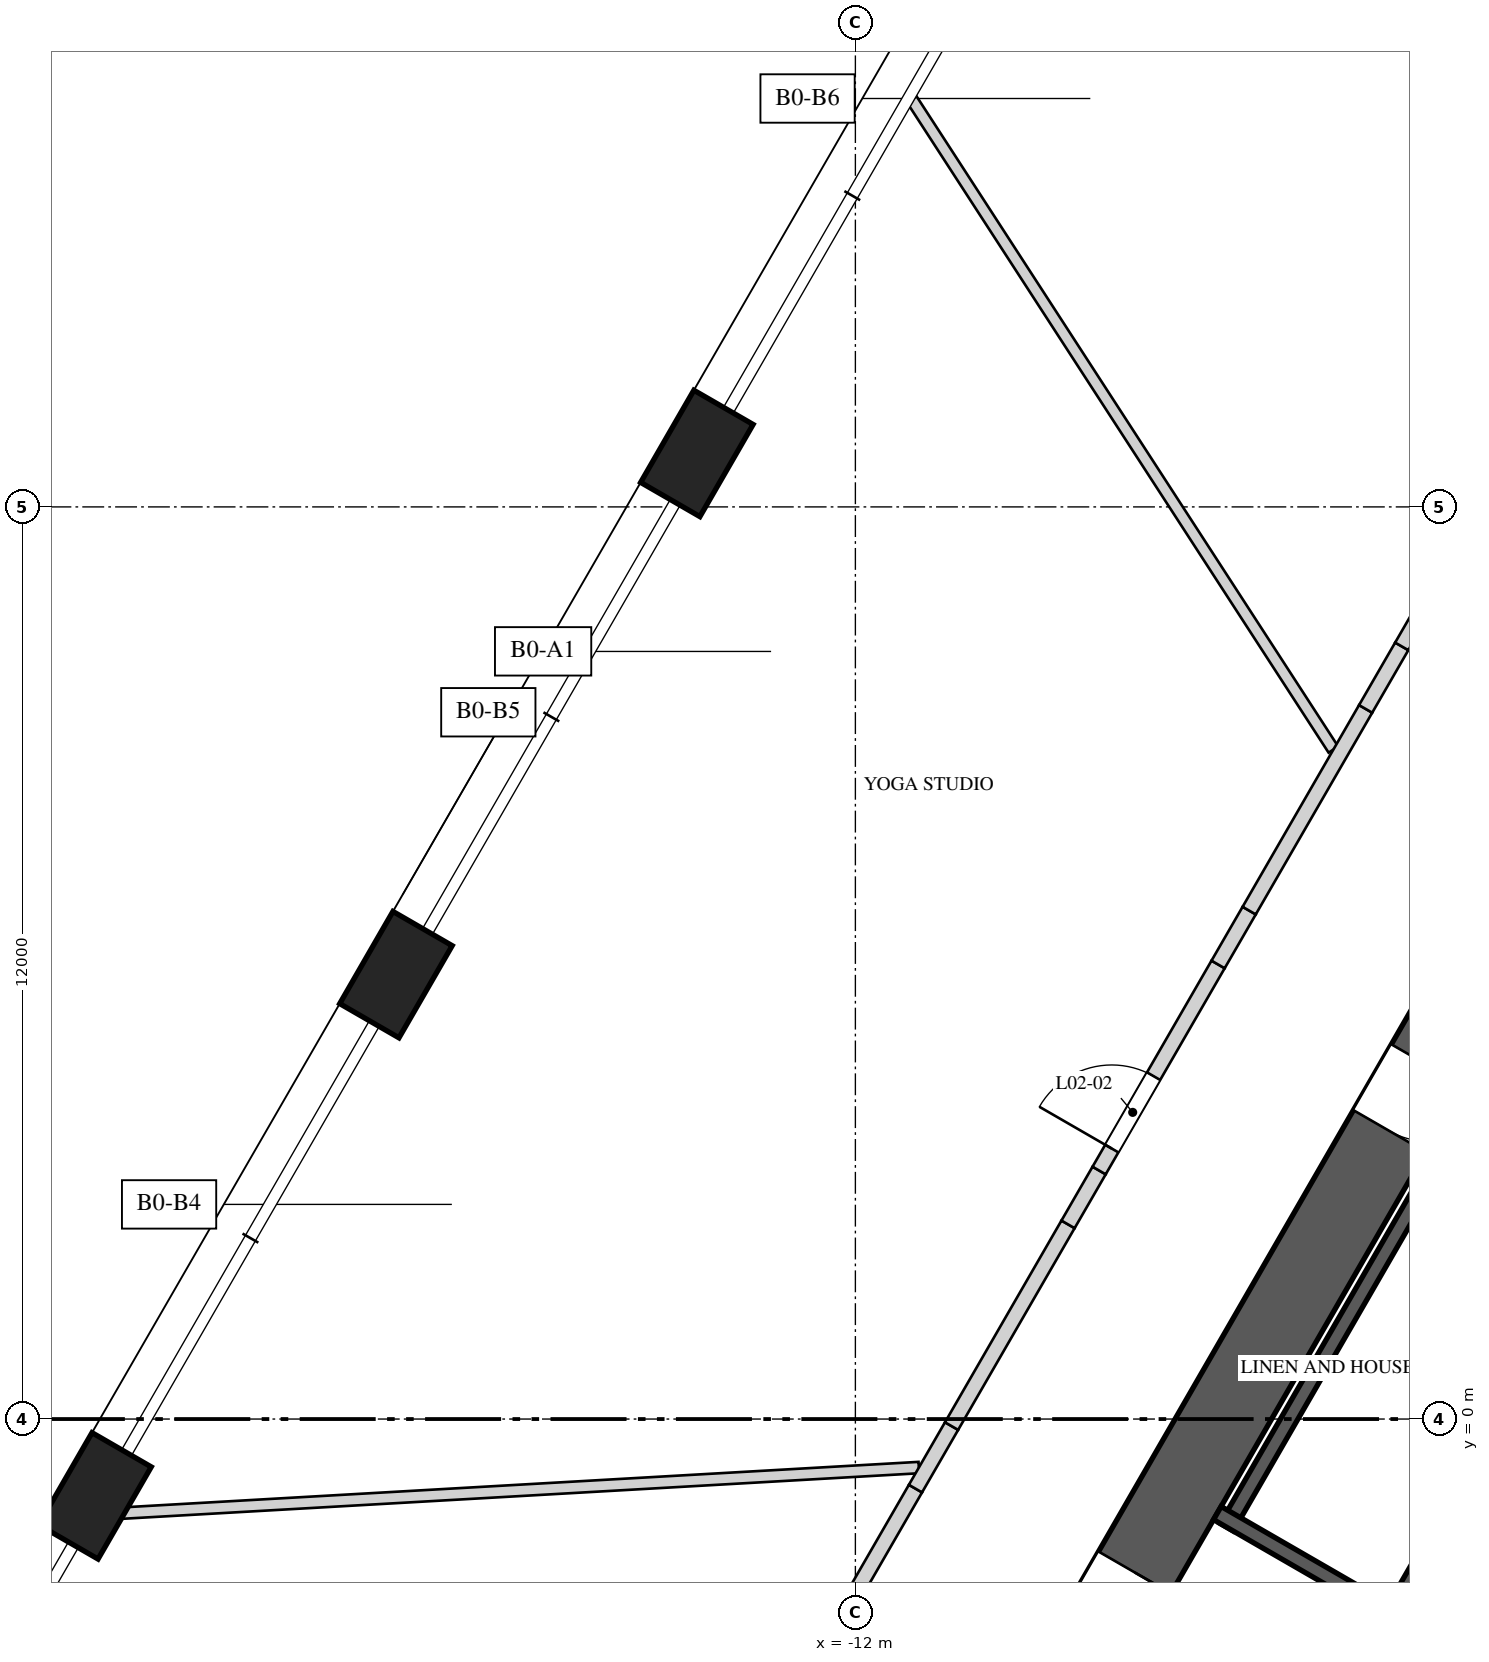
"""IFC4 building model, lengths in metres.
Left out: names, types, materials, properties, quantities, classifications, styles, units other than length and angle.
Written with IfcOpenShell. Run it as: python <this file> out.ifc"""

import sys

from ifc_helpers import new_model, si_unit, direction, frame, frame_2d, origin, origin_2d, place, context, subcontext, project, spatial, rectangle, extrude, element, fill, save


model = new_model("IFC4")
c1 = context("Model", 3, precision=1e-05, world=origin(), true_north=direction((0.0, 1.0)))
c2 = subcontext(c1, "Body", "Model", "MODEL_VIEW")
j1 = project(units=[si_unit("LENGTHUNIT", "METRE"), si_unit("PLANEANGLEUNIT", "RADIAN")], contexts=[c1])
p1 = place(None, origin())
s1 = spatial("IfcSite", under=j1, at=p1, CompositionType="ELEMENT")
p2 = place(p1, origin())
s2 = spatial("IfcBuilding", under=s1, at=p2, CompositionType="ELEMENT")
p3 = place(p2, frame((0.0, 0.0, 15.0)))
s3 = spatial("IfcBuildingStorey", under=s2, at=p3, CompositionType="ELEMENT", Elevation=15.0)
p4 = place(p3, frame((-1.126, 10.45, 0.0), z_axis=(0.0, 0.0, 1.0), x_axis=(-0.500001757713, -0.866024388966, 0.0)))
e1 = element("IfcWall", 1, at=p4, inside=s3, PredefinedType="SHEAR", context=c2, shape_type="SweptSolid", body=[
    extrude(rectangle(XDim=16.974, YDim=1.1, at=frame_2d((8.487, 0.0))), origin(), (0.0, 0.0, 1.0), 5.0),
])
p5 = place(p4, frame((6.692, 0.0, 0.0)))
e2 = element("IfcOpeningElement", 2, at=p5, cuts=e1, PredefinedType="OPENING", context=c2, shape_type="SweptSolid", body=[
    extrude(rectangle(XDim=1.0, YDim=2.4, at=frame_2d((0.5, 1.2))), frame((0.0, 0.56, 0.0), z_axis=(0.0, -1.0, 0.0), x_axis=(1.0, 0.0, 0.0)), (0.0, 0.0, 1.0), 1.12),
])
p6 = place(p4, frame((14.397, 0.0, 0.0)))
e3 = element("IfcOpeningElement", 3, at=p6, cuts=e1, PredefinedType="OPENING", context=c2, shape_type="SweptSolid", body=[
    extrude(rectangle(XDim=0.8, YDim=2.1, at=frame_2d((0.4, 1.05))), frame((0.0, 0.56, 0.0), z_axis=(0.0, -1.0, 0.0), x_axis=(1.0, 0.0, 0.0)), (0.0, 0.0, 1.0), 1.12),
])
for number, where, z_axis, x_axis in (
    (4, (-14.085, 12.704, 0.0), (0.0, 0.0, 1.0), (-0.5, -0.866, 0.0)),
    (5, (-18.044, 5.846, 0.0), (0.0, 0.0, 1.0), (-0.5, -0.866, 0.0)),
    (6, (-22.003, -1.011, 0.0), (0.0, 0.0, 1.0), (-0.5, -0.866, 0.0)),
):
    element("IfcColumn", number, at=place(p3, frame(where, z_axis=z_axis, x_axis=x_axis)), inside=s3, PredefinedType="COLUMN", context=c2, shape_type="SweptSolid", body=[
        extrude(rectangle(XDim=1.4, YDim=0.9, at=origin_2d()), origin(), (0.0, 0.0, 1.0), 5.0),
    ])
p7 = place(p3, frame((-4.993, -2.648, 0.0), z_axis=(0.0, 0.0, 1.0), x_axis=(0.499996545922, 0.866027397988, 0.0)))
e7 = element("IfcWall", 7, at=p7, inside=s3, PredefinedType="SOLIDWALL", context=c2, shape_type="SweptSolid", body=[
    extrude(rectangle(XDim=5.5, YDim=0.2, at=frame_2d((2.75, 0.0))), origin(), (0.0, 0.0, 1.0), 4.65),
])
p8 = place(p7, frame((2.275, 0.0, 0.0)))
e8 = element("IfcOpeningElement", 8, at=p8, cuts=e7, PredefinedType="OPENING", context=c2, shape_type="SweptSolid", body=[
    extrude(rectangle(XDim=0.95, YDim=2.4, at=frame_2d((0.475, 1.2))), frame((0.0, 0.11, 0.0), z_axis=(0.0, -1.0, 0.0), x_axis=(1.0, 0.0, 0.0)), (0.0, 0.0, 1.0), 0.22),
])
p9 = place(p3, frame((-4.365, 3.34, 0.0), z_axis=(0.0, 0.0, 1.0), x_axis=(-0.499996545922, -0.866027397988, 0.0)))
e9 = element("IfcWall", 9, at=p9, inside=s3, PredefinedType="SOLIDWALL", context=c2, shape_type="SweptSolid", body=[
    extrude(rectangle(XDim=5.5, YDim=0.2, at=frame_2d((2.75, 0.0))), origin(), (0.0, 0.0, 1.0), 4.65),
])
p10 = place(p3, frame((-5.03, -2.512, 0.0), z_axis=(0.0, 0.0, 1.0), x_axis=(-0.865989465428, 0.500062241894, 0.0)))
e10 = element("IfcWall", 10, at=p10, inside=s3, PredefinedType="SOLIDWALL", context=c2, shape_type="SweptSolid", body=[
    extrude(rectangle(XDim=2.55, YDim=0.2, at=frame_2d((1.275, 0.0))), origin(), (0.0, 0.0, 1.0), 4.65),
])
p11 = place(p3, frame((-11.165, -0.638, 0.0), z_axis=(0.0, 0.0, 1.0), x_axis=(-0.998369760977, -0.057077319203, 0.0)))
e11 = element("IfcWall", 11, at=p11, inside=s3, PredefinedType="PARTITIONING", context=c2, shape_type="SweptSolid", body=[
    extrude(rectangle(XDim=10.86, YDim=0.15, at=frame_2d((5.43, 0.0))), origin(), (0.0, 0.0, 1.0), 3.75),
])
p12 = place(p3, frame((-5.711, 8.808, 0.0), z_axis=(0.0, 0.0, 1.0), x_axis=(-0.544077203012, 0.839035158478, 0.0)))
e12 = element("IfcWall", 12, at=p12, inside=s3, PredefinedType="PARTITIONING", context=c2, shape_type="SweptSolid", body=[
    extrude(rectangle(XDim=10.194, YDim=0.15, at=frame_2d((5.097, 0.0))), origin(), (0.0, 0.0, 1.0), 4.65),
])
p13 = place(p3, frame((-12.617, -3.354, 0.0), z_axis=(0.0, 0.0, 1.0), x_axis=(0.49993514545, 0.866062844338, 0.0)))
e13 = element("IfcWall", 13, at=p13, inside=s3, PredefinedType="SOLIDWALL", context=c2, shape_type="SweptSolid", body=[
    extrude(rectangle(XDim=2.815, YDim=0.2, at=frame_2d((1.408, 0.0))), origin(), (0.0, 0.0, 1.0), 4.65),
])
p14 = place(p3, frame((-11.209, -0.915, 0.0), z_axis=(0.0, 0.0, 1.0), x_axis=(0.500174821557, 0.865924446982, 0.0)))
e14 = element("IfcWall", 14, at=p14, inside=s3, PredefinedType="SOLIDWALL", context=c2, shape_type="SweptSolid", body=[
    extrude(rectangle(XDim=0.95, YDim=0.2, at=frame_2d((0.475, 0.0))), origin(), (0.0, 0.0, 1.0), 3.75),
])
p15 = place(p3, frame((-10.734, -0.093, 0.0), z_axis=(0.0, 0.0, 1.0), x_axis=(0.499952348839, 0.866052913447, 0.0)))
e15 = element("IfcWall", 15, at=p15, inside=s3, PredefinedType="SOLIDWALL", context=c2, shape_type="SweptSolid", body=[
    extrude(rectangle(XDim=3.064, YDim=0.2, at=frame_2d((1.532, 0.0))), origin(), (0.0, 0.0, 1.0), 4.65),
])
p16 = place(p3, frame((-9.202, 2.561, 0.0), z_axis=(0.0, 0.0, 1.0), x_axis=(0.500118501653, 0.865956976012, 0.0)))
e16 = element("IfcWall", 16, at=p16, inside=s3, PredefinedType="SOLIDWALL", context=c2, shape_type="SweptSolid", body=[
    extrude(rectangle(XDim=0.818, YDim=0.2, at=frame_2d((0.409, 0.0))), origin(), (0.0, 0.0, 1.0), 3.75),
])
p17 = place(p3, frame((-8.793, 3.27, 0.0), z_axis=(0.0, 0.0, 1.0), x_axis=(0.499947505232, 0.866055709532, 0.0)))
e17 = element("IfcWall", 17, at=p17, inside=s3, PredefinedType="SOLIDWALL", context=c2, shape_type="SweptSolid", body=[
    extrude(rectangle(XDim=3.13, YDim=0.2, at=frame_2d((1.565, 0.0))), origin(), (0.0, 0.0, 1.0), 4.65),
])
p18 = place(p17, frame((0.333, 0.0, 0.0)))
e18 = element("IfcOpeningElement", 18, at=p18, cuts=e17, PredefinedType="OPENING", context=c2, shape_type="SweptSolid", body=[
    extrude(rectangle(XDim=1.1, YDim=2.4, at=frame_2d((0.55, 1.2))), frame((0.0, 0.11, 0.0), z_axis=(0.0, -1.0, 0.0), x_axis=(1.0, 0.0, 0.0)), (0.0, 0.0, 1.0), 0.22),
])
p19 = place(p3, frame((-7.228, 5.98, 0.0), z_axis=(0.0, 0.0, 1.0), x_axis=(0.500118501653, 0.865956976012, 0.0)))
e19 = element("IfcWall", 19, at=p19, inside=s3, PredefinedType="SOLIDWALL", context=c2, shape_type="SweptSolid", body=[
    extrude(rectangle(XDim=0.818, YDim=0.2, at=frame_2d((0.409, 0.0))), origin(), (0.0, 0.0, 1.0), 3.75),
])
p20 = place(p3, frame((-6.819, 6.689, 0.0), z_axis=(0.0, 0.0, 1.0), x_axis=(0.499952348839, 0.866052913447, 0.0)))
e20 = element("IfcWall", 20, at=p20, inside=s3, PredefinedType="SOLIDWALL", context=c2, shape_type="SweptSolid", body=[
    extrude(rectangle(XDim=3.064, YDim=0.2, at=frame_2d((1.532, 0.0))), origin(), (0.0, 0.0, 1.0), 4.65),
])
p21 = place(p3, frame((-5.287, 9.343, 0.0), z_axis=(0.0, 0.0, 1.0), x_axis=(0.500174821557, 0.865924446982, 0.0)))
e21 = element("IfcWall", 21, at=p21, inside=s3, PredefinedType="SOLIDWALL", context=c2, shape_type="SweptSolid", body=[
    extrude(rectangle(XDim=0.95, YDim=0.2, at=frame_2d((0.475, 0.0))), origin(), (0.0, 0.0, 1.0), 3.75),
])
p22 = place(p3, frame((-4.812, 10.165, 0.0), z_axis=(0.0, 0.0, 1.0), x_axis=(0.500000186108, 0.866025296335, 0.0)))
e22 = element("IfcWall", 22, at=p22, inside=s3, PredefinedType="SOLIDWALL", context=c2, shape_type="SweptSolid", body=[
    extrude(rectangle(XDim=2.815, YDim=0.2, at=frame_2d((1.408, 0.0))), origin(), (0.0, 0.0, 1.0), 4.65),
])
p23 = place(p5, origin())
e23 = element("IfcDoor", 23, at=p23, inside=s3, OperationType="SINGLE_SWING_LEFT", PredefinedType="DOOR", context=c2, shape_type="SweptSolid", body=[
    extrude(rectangle(XDim=1.0, YDim=2.4, at=frame_2d((0.5, 1.2))), frame((0.0, 0.025, 0.0), z_axis=(0.0, -1.0, 0.0), x_axis=(1.0, 0.0, 0.0)), (0.0, 0.0, 1.0), 0.05),
])
fill(e2, e23)
p24 = place(p6, origin())
e24 = element("IfcDoor", 24, at=p24, inside=s3, OperationType="SINGLE_SWING_RIGHT", PredefinedType="DOOR", context=c2, shape_type="SweptSolid", body=[
    extrude(rectangle(XDim=0.8, YDim=2.1, at=frame_2d((0.4, 1.05))), frame((0.0, 0.025, 0.0), z_axis=(0.0, -1.0, 0.0), x_axis=(1.0, 0.0, 0.0)), (0.0, 0.0, 1.0), 0.05),
])
fill(e3, e24)
p25 = place(p18, origin())
e25 = element("IfcDoor", 25, at=p25, inside=s3, OperationType="SINGLE_SWING_RIGHT", PredefinedType="DOOR", context=c2, shape_type="SweptSolid", body=[
    extrude(rectangle(XDim=1.1, YDim=2.4, at=frame_2d((0.55, 1.2))), frame((0.0, 0.025, 0.0), z_axis=(0.0, -1.0, 0.0), x_axis=(1.0, 0.0, 0.0)), (0.0, 0.0, 1.0), 0.05),
])
fill(e18, e25)
save(model, sys.argv[1])
